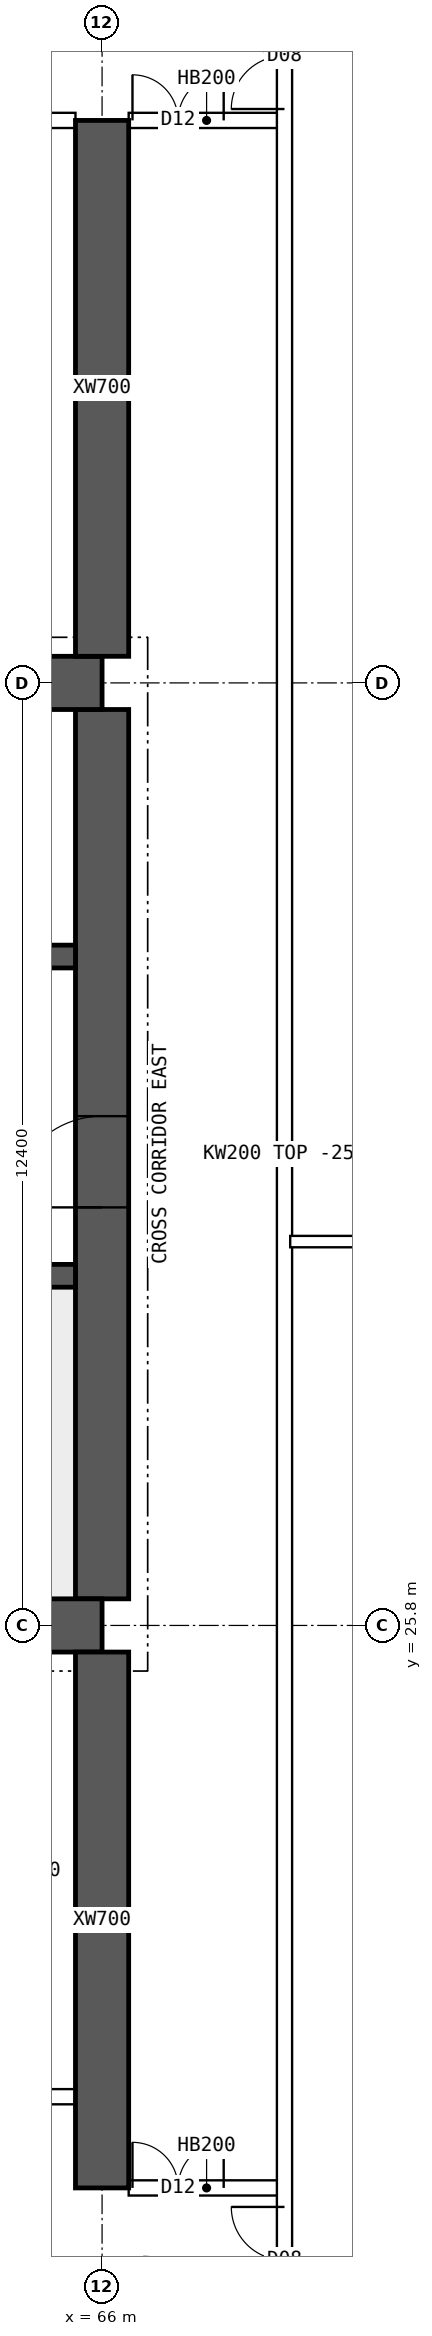
"""IFC4 building model, lengths in metres.
Left out: names, types, materials, properties, quantities, classifications, styles, units other than length and angle.
Written with IfcOpenShell. Run it as: python <this file> out.ifc"""

import sys

from ifc_helpers import new_model, si_unit, direction, frame, frame_2d, origin, place, context, subcontext, project, spatial, polyline, rectangle, outline, extrude, element, fill, save


model = new_model("IFC4")
c1 = context("Model", 3, precision=1e-05, world=origin(), true_north=direction((0.0, 1.0)))
c2 = subcontext(c1, "Body", "Model", "MODEL_VIEW")
j1 = project(units=[si_unit("LENGTHUNIT", "METRE"), si_unit("PLANEANGLEUNIT", "RADIAN")], contexts=[c1])
p1 = place(None, origin())
s1 = spatial("IfcSite", under=j1, at=p1, CompositionType="ELEMENT")
p2 = place(p1, origin())
s2 = spatial("IfcBuilding", under=s1, at=p2, CompositionType="ELEMENT")
p3 = place(p2, frame((0.0, 0.0, 239.05)))
s3 = spatial("IfcBuildingStorey", under=s2, at=p3, CompositionType="ELEMENT", Elevation=239.05)
for number, where, z_axis, x_axis in (
    (1, (18.0, 25.8, 0.0), (0.0, 0.0, 1.0), (1.0, 0.0, 0.0)),
    (2, (18.0, 38.2, 0.0), (0.0, 0.0, 1.0), (1.0, 0.0, 0.0)),
):
    element("IfcWall", number, at=place(p3, frame(where, z_axis=z_axis, x_axis=x_axis)), inside=s3, PredefinedType="SHEAR", context=c2, shape_type="SweptSolid", body=[
        extrude(rectangle(XDim=48.0, YDim=0.7, at=frame_2d((24.0, 0.0))), origin(), (0.0, 0.0, 1.0), 3.75),
    ])
p4 = place(p3, frame((66.0, 26.15, 0.0), z_axis=(0.0, 0.0, 1.0), x_axis=(0.0, 1.0, 0.0)))
e3 = element("IfcWall", 3, at=p4, inside=s3, PredefinedType="SHEAR", context=c2, shape_type="SweptSolid", body=[
    extrude(rectangle(XDim=11.7, YDim=0.7, at=frame_2d((5.85, 0.0))), origin(), (0.0, 0.0, 1.0), 3.75),
])
p5 = place(p4, frame((5.15, 0.0, 0.0)))
e4 = element("IfcOpeningElement", 4, at=p5, cuts=e3, PredefinedType="OPENING", context=c2, shape_type="SweptSolid", body=[
    extrude(rectangle(XDim=1.2, YDim=2.1, at=frame_2d((0.6, 1.05))), frame((0.0, 0.36, 0.0), z_axis=(0.0, -1.0, 0.0), x_axis=(1.0, 0.0, 0.0)), (0.0, 0.0, 1.0), 0.72),
])
p6 = place(p3, frame((18.35, 30.4, 0.0), z_axis=(0.0, 0.0, 1.0), x_axis=(1.0, 0.0, 0.0)))
e5 = element("IfcWall", 5, at=p6, inside=s3, PredefinedType="SHEAR", context=c2, shape_type="SweptSolid", body=[
    extrude(rectangle(XDim=47.3, YDim=0.3, at=frame_2d((23.65, 0.0))), origin(), (0.0, 0.0, 1.0), 3.75),
])
p7 = place(p6, frame((0.4, 0.0, 0.0)))
e6 = element("IfcOpeningElement", 6, at=p7, cuts=e5, PredefinedType="OPENING", context=c2, shape_type="SweptSolid", body=[
    extrude(rectangle(XDim=1.0, YDim=2.1, at=frame_2d((0.5, 1.05))), frame((0.0, 0.16, 0.0), z_axis=(0.0, -1.0, 0.0), x_axis=(1.0, 0.0, 0.0)), (0.0, 0.0, 1.0), 0.32),
])
p8 = place(p6, frame((45.9, 0.0, 0.0)))
e7 = element("IfcOpeningElement", 7, at=p8, cuts=e5, PredefinedType="OPENING", context=c2, shape_type="SweptSolid", body=[
    extrude(rectangle(XDim=1.0, YDim=2.1, at=frame_2d((0.5, 1.05))), frame((0.0, 0.16, 0.0), z_axis=(0.0, -1.0, 0.0), x_axis=(1.0, 0.0, 0.0)), (0.0, 0.0, 1.0), 0.32),
])
p9 = place(p6, frame((8.4, 0.0, 0.0)))
e8 = element("IfcOpeningElement", 8, at=p9, cuts=e5, PredefinedType="OPENING", context=c2, shape_type="SweptSolid", body=[
    extrude(rectangle(XDim=1.1, YDim=2.1, at=frame_2d((0.55, 1.05))), frame((0.0, 0.16, 0.0), z_axis=(0.0, -1.0, 0.0), x_axis=(1.0, 0.0, 0.0)), (0.0, 0.0, 1.0), 0.32),
])
p10 = place(p6, frame((11.0, 0.0, 0.0)))
e9 = element("IfcOpeningElement", 9, at=p10, cuts=e5, PredefinedType="OPENING", context=c2, shape_type="SweptSolid", body=[
    extrude(rectangle(XDim=1.1, YDim=2.1, at=frame_2d((0.55, 1.05))), frame((0.0, 0.16, 0.0), z_axis=(0.0, -1.0, 0.0), x_axis=(1.0, 0.0, 0.0)), (0.0, 0.0, 1.0), 0.32),
])
p11 = place(p6, frame((13.6, 0.0, 0.0)))
e10 = element("IfcOpeningElement", 10, at=p11, cuts=e5, PredefinedType="OPENING", context=c2, shape_type="SweptSolid", body=[
    extrude(rectangle(XDim=1.1, YDim=2.1, at=frame_2d((0.55, 1.05))), frame((0.0, 0.16, 0.0), z_axis=(0.0, -1.0, 0.0), x_axis=(1.0, 0.0, 0.0)), (0.0, 0.0, 1.0), 0.32),
])
p12 = place(p6, frame((16.2, 0.0, 0.0)))
e11 = element("IfcOpeningElement", 11, at=p12, cuts=e5, PredefinedType="OPENING", context=c2, shape_type="SweptSolid", body=[
    extrude(rectangle(XDim=1.1, YDim=2.1, at=frame_2d((0.55, 1.05))), frame((0.0, 0.16, 0.0), z_axis=(0.0, -1.0, 0.0), x_axis=(1.0, 0.0, 0.0)), (0.0, 0.0, 1.0), 0.32),
])
p13 = place(p6, frame((18.975, 0.0, 0.0)))
e12 = element("IfcOpeningElement", 12, at=p13, cuts=e5, PredefinedType="OPENING", context=c2, shape_type="SweptSolid", body=[
    extrude(rectangle(XDim=0.9, YDim=2.1, at=frame_2d((0.45, 1.05))), frame((0.0, 0.16, 0.0), z_axis=(0.0, -1.0, 0.0), x_axis=(1.0, 0.0, 0.0)), (0.0, 0.0, 1.0), 0.32),
])
p14 = place(p6, frame((24.475, 0.0, 0.0)))
e13 = element("IfcOpeningElement", 13, at=p14, cuts=e5, PredefinedType="OPENING", context=c2, shape_type="SweptSolid", body=[
    extrude(rectangle(XDim=0.9, YDim=2.1, at=frame_2d((0.45, 1.05))), frame((0.0, 0.16, 0.0), z_axis=(0.0, -1.0, 0.0), x_axis=(1.0, 0.0, 0.0)), (0.0, 0.0, 1.0), 0.32),
])
p15 = place(p6, frame((30.267, 0.0, 0.0)))
e14 = element("IfcOpeningElement", 14, at=p15, cuts=e5, PredefinedType="OPENING", context=c2, shape_type="SweptSolid", body=[
    extrude(rectangle(XDim=1.1, YDim=2.1, at=frame_2d((0.55, 1.05))), frame((0.0, 0.16, 0.0), z_axis=(0.0, -1.0, 0.0), x_axis=(1.0, 0.0, 0.0)), (0.0, 0.0, 1.0), 0.32),
])
p16 = place(p6, frame((33.8, 0.0, 0.0)))
e15 = element("IfcOpeningElement", 15, at=p16, cuts=e5, PredefinedType="OPENING", context=c2, shape_type="SweptSolid", body=[
    extrude(rectangle(XDim=1.1, YDim=2.1, at=frame_2d((0.55, 1.05))), frame((0.0, 0.16, 0.0), z_axis=(0.0, -1.0, 0.0), x_axis=(1.0, 0.0, 0.0)), (0.0, 0.0, 1.0), 0.32),
])
p17 = place(p6, frame((37.333, 0.0, 0.0)))
e16 = element("IfcOpeningElement", 16, at=p17, cuts=e5, PredefinedType="OPENING", context=c2, shape_type="SweptSolid", body=[
    extrude(rectangle(XDim=1.1, YDim=2.1, at=frame_2d((0.55, 1.05))), frame((0.0, 0.16, 0.0), z_axis=(0.0, -1.0, 0.0), x_axis=(1.0, 0.0, 0.0)), (0.0, 0.0, 1.0), 0.32),
])
p18 = place(p3, frame((18.35, 34.6, 0.0), z_axis=(0.0, 0.0, 1.0), x_axis=(1.0, 0.0, 0.0)))
e17 = element("IfcWall", 17, at=p18, inside=s3, PredefinedType="SHEAR", context=c2, shape_type="SweptSolid", body=[
    extrude(rectangle(XDim=47.3, YDim=0.3, at=frame_2d((23.65, 0.0))), origin(), (0.0, 0.0, 1.0), 3.75),
])
p19 = place(p18, frame((0.9, 0.0, 0.0)))
e18 = element("IfcOpeningElement", 18, at=p19, cuts=e17, PredefinedType="OPENING", context=c2, shape_type="SweptSolid", body=[
    extrude(rectangle(XDim=1.1, YDim=2.1, at=frame_2d((0.55, 1.05))), frame((0.0, 0.16, 0.0), z_axis=(0.0, -1.0, 0.0), x_axis=(1.0, 0.0, 0.0)), (0.0, 0.0, 1.0), 0.32),
])
p20 = place(p18, frame((45.3, 0.0, 0.0)))
e19 = element("IfcOpeningElement", 19, at=p20, cuts=e17, PredefinedType="OPENING", context=c2, shape_type="SweptSolid", body=[
    extrude(rectangle(XDim=1.1, YDim=2.1, at=frame_2d((0.55, 1.05))), frame((0.0, 0.16, 0.0), z_axis=(0.0, -1.0, 0.0), x_axis=(1.0, 0.0, 0.0)), (0.0, 0.0, 1.0), 0.32),
])
p21 = place(p18, frame((4.25, 0.0, 0.0)))
e20 = element("IfcOpeningElement", 20, at=p21, cuts=e17, PredefinedType="OPENING", context=c2, shape_type="SweptSolid", body=[
    extrude(rectangle(XDim=0.9, YDim=2.1, at=frame_2d((0.45, 1.05))), frame((0.0, 0.16, 0.0), z_axis=(0.0, -1.0, 0.0), x_axis=(1.0, 0.0, 0.0)), (0.0, 0.0, 1.0), 0.32),
])
p22 = place(p18, frame((42.15, 0.0, 0.0)))
e21 = element("IfcOpeningElement", 21, at=p22, cuts=e17, PredefinedType="OPENING", context=c2, shape_type="SweptSolid", body=[
    extrude(rectangle(XDim=0.9, YDim=2.1, at=frame_2d((0.45, 1.05))), frame((0.0, 0.16, 0.0), z_axis=(0.0, -1.0, 0.0), x_axis=(1.0, 0.0, 0.0)), (0.0, 0.0, 1.0), 0.32),
])
p23 = place(p18, frame((9.025, 0.0, 0.0)))
e22 = element("IfcOpeningElement", 22, at=p23, cuts=e17, PredefinedType="OPENING", context=c2, shape_type="SweptSolid", body=[
    extrude(rectangle(XDim=0.9, YDim=2.1, at=frame_2d((0.45, 1.05))), frame((0.0, 0.16, 0.0), z_axis=(0.0, -1.0, 0.0), x_axis=(1.0, 0.0, 0.0)), (0.0, 0.0, 1.0), 0.32),
])
p24 = place(p18, frame((12.999, 0.0, 0.0)))
e23 = element("IfcOpeningElement", 23, at=p24, cuts=e17, PredefinedType="OPENING", context=c2, shape_type="SweptSolid", body=[
    extrude(rectangle(XDim=0.9, YDim=2.1, at=frame_2d((0.45, 1.05))), frame((0.0, 0.16, 0.0), z_axis=(0.0, -1.0, 0.0), x_axis=(1.0, 0.0, 0.0)), (0.0, 0.0, 1.0), 0.32),
])
p25 = place(p18, frame((16.646, 0.0, 0.0)))
e24 = element("IfcOpeningElement", 24, at=p25, cuts=e17, PredefinedType="OPENING", context=c2, shape_type="SweptSolid", body=[
    extrude(rectangle(XDim=0.9, YDim=2.1, at=frame_2d((0.45, 1.05))), frame((0.0, 0.16, 0.0), z_axis=(0.0, -1.0, 0.0), x_axis=(1.0, 0.0, 0.0)), (0.0, 0.0, 1.0), 0.32),
])
p26 = place(p18, frame((20.405, 0.0, 0.0)))
e25 = element("IfcOpeningElement", 25, at=p26, cuts=e17, PredefinedType="OPENING", context=c2, shape_type="SweptSolid", body=[
    extrude(rectangle(XDim=0.9, YDim=2.1, at=frame_2d((0.45, 1.05))), frame((0.0, 0.16, 0.0), z_axis=(0.0, -1.0, 0.0), x_axis=(1.0, 0.0, 0.0)), (0.0, 0.0, 1.0), 0.32),
])
p27 = place(p18, frame((24.811, 0.0, 0.0)))
e26 = element("IfcOpeningElement", 26, at=p27, cuts=e17, PredefinedType="OPENING", context=c2, shape_type="SweptSolid", body=[
    extrude(rectangle(XDim=0.9, YDim=2.1, at=frame_2d((0.45, 1.05))), frame((0.0, 0.16, 0.0), z_axis=(0.0, -1.0, 0.0), x_axis=(1.0, 0.0, 0.0)), (0.0, 0.0, 1.0), 0.32),
])
p28 = place(p18, frame((27.608, 0.0, 0.0)))
e27 = element("IfcOpeningElement", 27, at=p28, cuts=e17, PredefinedType="OPENING", context=c2, shape_type="SweptSolid", body=[
    extrude(rectangle(XDim=0.9, YDim=2.1, at=frame_2d((0.45, 1.05))), frame((0.0, 0.16, 0.0), z_axis=(0.0, -1.0, 0.0), x_axis=(1.0, 0.0, 0.0)), (0.0, 0.0, 1.0), 0.32),
])
p29 = place(p18, frame((30.791, 0.0, 0.0)))
e28 = element("IfcOpeningElement", 28, at=p29, cuts=e17, PredefinedType="OPENING", context=c2, shape_type="SweptSolid", body=[
    extrude(rectangle(XDim=0.9, YDim=2.1, at=frame_2d((0.45, 1.05))), frame((0.0, 0.16, 0.0), z_axis=(0.0, -1.0, 0.0), x_axis=(1.0, 0.0, 0.0)), (0.0, 0.0, 1.0), 0.32),
])
p30 = place(p18, frame((34.742, 0.0, 0.0)))
e29 = element("IfcOpeningElement", 29, at=p30, cuts=e17, PredefinedType="OPENING", context=c2, shape_type="SweptSolid", body=[
    extrude(rectangle(XDim=0.9, YDim=2.1, at=frame_2d((0.45, 1.05))), frame((0.0, 0.16, 0.0), z_axis=(0.0, -1.0, 0.0), x_axis=(1.0, 0.0, 0.0)), (0.0, 0.0, 1.0), 0.32),
])
p31 = place(p18, frame((37.68, 0.0, 0.0)))
e30 = element("IfcOpeningElement", 30, at=p31, cuts=e17, PredefinedType="OPENING", context=c2, shape_type="SweptSolid", body=[
    extrude(rectangle(XDim=0.9, YDim=2.1, at=frame_2d((0.45, 1.05))), frame((0.0, 0.16, 0.0), z_axis=(0.0, -1.0, 0.0), x_axis=(1.0, 0.0, 0.0)), (0.0, 0.0, 1.0), 0.32),
])
for number, where, z_axis, x_axis in (
    (31, (66.0, 18.4, 0.0), (0.0, 0.0, 1.0), (0.0, 1.0, 0.0)),
    (32, (66.0, 38.55, 0.0), (0.0, 0.0, 1.0), (0.0, 1.0, 0.0)),
):
    element("IfcWall", number, at=place(p3, frame(where, z_axis=z_axis, x_axis=x_axis)), inside=s3, PredefinedType="SHEAR", context=c2, shape_type="SweptSolid", body=[
        extrude(rectangle(XDim=7.05, YDim=0.7, at=frame_2d((3.525, 0.0))), origin(), (0.0, 0.0, 1.0), 3.75),
    ])
p32 = place(p3, frame((66.35, 18.4, 0.0), z_axis=(0.0, 0.0, 1.0), x_axis=(1.0, 0.0, 0.0)))
e33 = element("IfcWall", 33, at=p32, inside=s3, PredefinedType="SOLIDWALL", context=c2, shape_type="SweptSolid", body=[
    extrude(rectangle(XDim=2.05, YDim=0.2, at=frame_2d((1.025, 0.0))), origin(), (0.0, 0.0, 1.0), 3.5),
])
p33 = place(p32, frame((0.05, 0.0, 0.0)))
e34 = element("IfcOpeningElement", 34, at=p33, cuts=e33, PredefinedType="OPENING", context=c2, shape_type="SweptSolid", body=[
    extrude(rectangle(XDim=1.2, YDim=2.1, at=frame_2d((0.6, 1.05))), frame((0.0, 0.11, 0.0), z_axis=(0.0, -1.0, 0.0), x_axis=(1.0, 0.0, 0.0)), (0.0, 0.0, 1.0), 0.22),
])
p34 = place(p3, frame((60.35, 45.6, 0.0), z_axis=(0.0, 0.0, 1.0), x_axis=(1.0, 0.0, 0.0)))
e35 = element("IfcWall", 35, at=p34, inside=s3, PredefinedType="SOLIDWALL", context=c2, shape_type="SweptSolid", body=[
    extrude(rectangle(XDim=5.3, YDim=0.2, at=frame_2d((2.65, 0.0))), origin(), (0.0, 0.0, 1.0), 3.5),
])
p35 = place(p34, frame((0.525, 0.0, 0.0)))
e36 = element("IfcOpeningElement", 36, at=p35, cuts=e35, PredefinedType="OPENING", context=c2, shape_type="SweptSolid", body=[
    extrude(rectangle(XDim=1.0, YDim=2.1, at=frame_2d((0.5, 1.05))), frame((0.0, 0.11, 0.0), z_axis=(0.0, -1.0, 0.0), x_axis=(1.0, 0.0, 0.0)), (0.0, 0.0, 1.0), 0.22),
])
p36 = place(p3, frame((66.35, 45.6, 0.0), z_axis=(0.0, 0.0, 1.0), x_axis=(1.0, 0.0, 0.0)))
e37 = element("IfcWall", 37, at=p36, inside=s3, PredefinedType="SOLIDWALL", context=c2, shape_type="SweptSolid", body=[
    extrude(rectangle(XDim=2.05, YDim=0.2, at=frame_2d((1.025, 0.0))), origin(), (0.0, 0.0, 1.0), 3.5),
])
p37 = place(p36, frame((0.05, 0.0, 0.0)))
e38 = element("IfcOpeningElement", 38, at=p37, cuts=e37, PredefinedType="OPENING", context=c2, shape_type="SweptSolid", body=[
    extrude(rectangle(XDim=1.2, YDim=2.1, at=frame_2d((0.6, 1.05))), frame((0.0, 0.11, 0.0), z_axis=(0.0, -1.0, 0.0), x_axis=(1.0, 0.0, 0.0)), (0.0, 0.0, 1.0), 0.22),
])
p38 = place(p3, frame((60.35, 19.6, 0.0), z_axis=(0.0, 0.0, 1.0), x_axis=(1.0, 0.0, 0.0)))
e39 = element("IfcWall", 39, at=p38, inside=s3, PredefinedType="SOLIDWALL", context=c2, shape_type="SweptSolid", body=[
    extrude(rectangle(XDim=5.3, YDim=0.2, at=frame_2d((2.65, 0.0))), origin(), (0.0, 0.0, 1.0), 3.5),
])
p39 = place(p38, frame((0.525, 0.0, 0.0)))
e40 = element("IfcOpeningElement", 40, at=p39, cuts=e39, PredefinedType="OPENING", context=c2, shape_type="SweptSolid", body=[
    extrude(rectangle(XDim=1.0, YDim=2.1, at=frame_2d((0.5, 1.05))), frame((0.0, 0.11, 0.0), z_axis=(0.0, -1.0, 0.0), x_axis=(1.0, 0.0, 0.0)), (0.0, 0.0, 1.0), 0.22),
])
p40 = place(p3, frame((68.475, 30.85, 0.0), z_axis=(0.0, 0.0, 1.0), x_axis=(1.0, 0.0, 0.0)))
e41 = element("IfcWall", 41, at=p40, inside=s3, PredefinedType="PARTITIONING", context=c2, shape_type="SweptSolid", body=[
    extrude(outline(polyline([(0.0, 0.0), (6.82, 0.0), (6.82, 3.5), (3.827, 3.5), (3.825, 3.05), (3.227, 3.05), (3.225, 3.5), (0.0, 3.5), (0.0, 0.0)])), frame((0.0, 0.075, 0.0), z_axis=(0.0, -1.0, 0.0), x_axis=(1.0, 0.0, 0.0)), (0.0, 0.0, 1.0), 0.15),
])
p41 = place(p3, frame((68.4, 11.646, 0.0), z_axis=(0.0, 0.0, 1.0), x_axis=(0.0, 1.0, 0.0)))
e42 = element("IfcWall", 42, at=p41, inside=s3, PredefinedType="SOLIDWALL", context=c2, shape_type="SweptSolid", body=[
    extrude(rectangle(XDim=40.708, YDim=0.2, at=frame_2d((20.354, 0.0))), origin(), (0.0, 0.0, 1.0), 3.5),
])
p42 = place(p41, frame((5.104, 0.0, 0.0)))
e43 = element("IfcOpeningElement", 43, at=p42, cuts=e42, PredefinedType="OPENING", context=c2, shape_type="SweptSolid", body=[
    extrude(rectangle(XDim=1.4, YDim=2.1, at=frame_2d((0.7, 1.05))), frame((0.0, 0.11, 0.0), z_axis=(0.0, -1.0, 0.0), x_axis=(1.0, 0.0, 0.0)), (0.0, 0.0, 1.0), 0.22),
])
p43 = place(p41, frame((34.104, 0.0, 0.0)))
e44 = element("IfcOpeningElement", 44, at=p43, cuts=e42, PredefinedType="OPENING", context=c2, shape_type="SweptSolid", body=[
    extrude(rectangle(XDim=1.4, YDim=2.1, at=frame_2d((0.7, 1.05))), frame((0.0, 0.11, 0.0), z_axis=(0.0, -1.0, 0.0), x_axis=(1.0, 0.0, 0.0)), (0.0, 0.0, 1.0), 0.22),
])
p44 = place(p5, origin())
e45 = element("IfcDoor", 45, at=p44, inside=s3, OperationType="SINGLE_SWING_LEFT", PredefinedType="DOOR", context=c2, shape_type="SweptSolid", body=[
    extrude(rectangle(XDim=1.2, YDim=2.1, at=frame_2d((0.6, 1.05))), frame((0.0, 0.025, 0.0), z_axis=(0.0, -1.0, 0.0), x_axis=(1.0, 0.0, 0.0)), (0.0, 0.0, 1.0), 0.05),
])
fill(e4, e45)
p45 = place(p33, origin())
e46 = element("IfcDoor", 46, at=p45, inside=s3, OperationType="DOUBLE_DOOR_SINGLE_SWING", PredefinedType="DOOR", context=c2, shape_type="SweptSolid", body=[
    extrude(rectangle(XDim=1.2, YDim=2.1, at=frame_2d((0.6, 1.05))), frame((0.0, 0.025, 0.0), z_axis=(0.0, -1.0, 0.0), x_axis=(1.0, 0.0, 0.0)), (0.0, 0.0, 1.0), 0.05),
])
fill(e34, e46)
p46 = place(p37, origin())
e47 = element("IfcDoor", 47, at=p46, inside=s3, OperationType="DOUBLE_DOOR_SINGLE_SWING", PredefinedType="DOOR", context=c2, shape_type="SweptSolid", body=[
    extrude(rectangle(XDim=1.2, YDim=2.1, at=frame_2d((0.6, 1.05))), frame((0.0, 0.025, 0.0), z_axis=(0.0, -1.0, 0.0), x_axis=(1.0, 0.0, 0.0)), (0.0, 0.0, 1.0), 0.05),
])
fill(e38, e47)
p47 = place(p42, origin())
e48 = element("IfcDoor", 48, at=p47, inside=s3, OperationType="DOUBLE_DOOR_SINGLE_SWING", PredefinedType="DOOR", context=c2, shape_type="SweptSolid", body=[
    extrude(rectangle(XDim=1.4, YDim=2.1, at=frame_2d((0.7, 1.05))), frame((0.0, 0.025, 0.0), z_axis=(0.0, -1.0, 0.0), x_axis=(1.0, 0.0, 0.0)), (0.0, 0.0, 1.0), 0.05),
])
fill(e43, e48)
p48 = place(p43, origin())
e49 = element("IfcDoor", 49, at=p48, inside=s3, OperationType="DOUBLE_DOOR_SINGLE_SWING", PredefinedType="DOOR", context=c2, shape_type="SweptSolid", body=[
    extrude(rectangle(XDim=1.4, YDim=2.1, at=frame_2d((0.7, 1.05))), frame((0.0, 0.025, 0.0), z_axis=(0.0, -1.0, 0.0), x_axis=(1.0, 0.0, 0.0)), (0.0, 0.0, 1.0), 0.05),
])
fill(e44, e49)
save(model, sys.argv[1])
